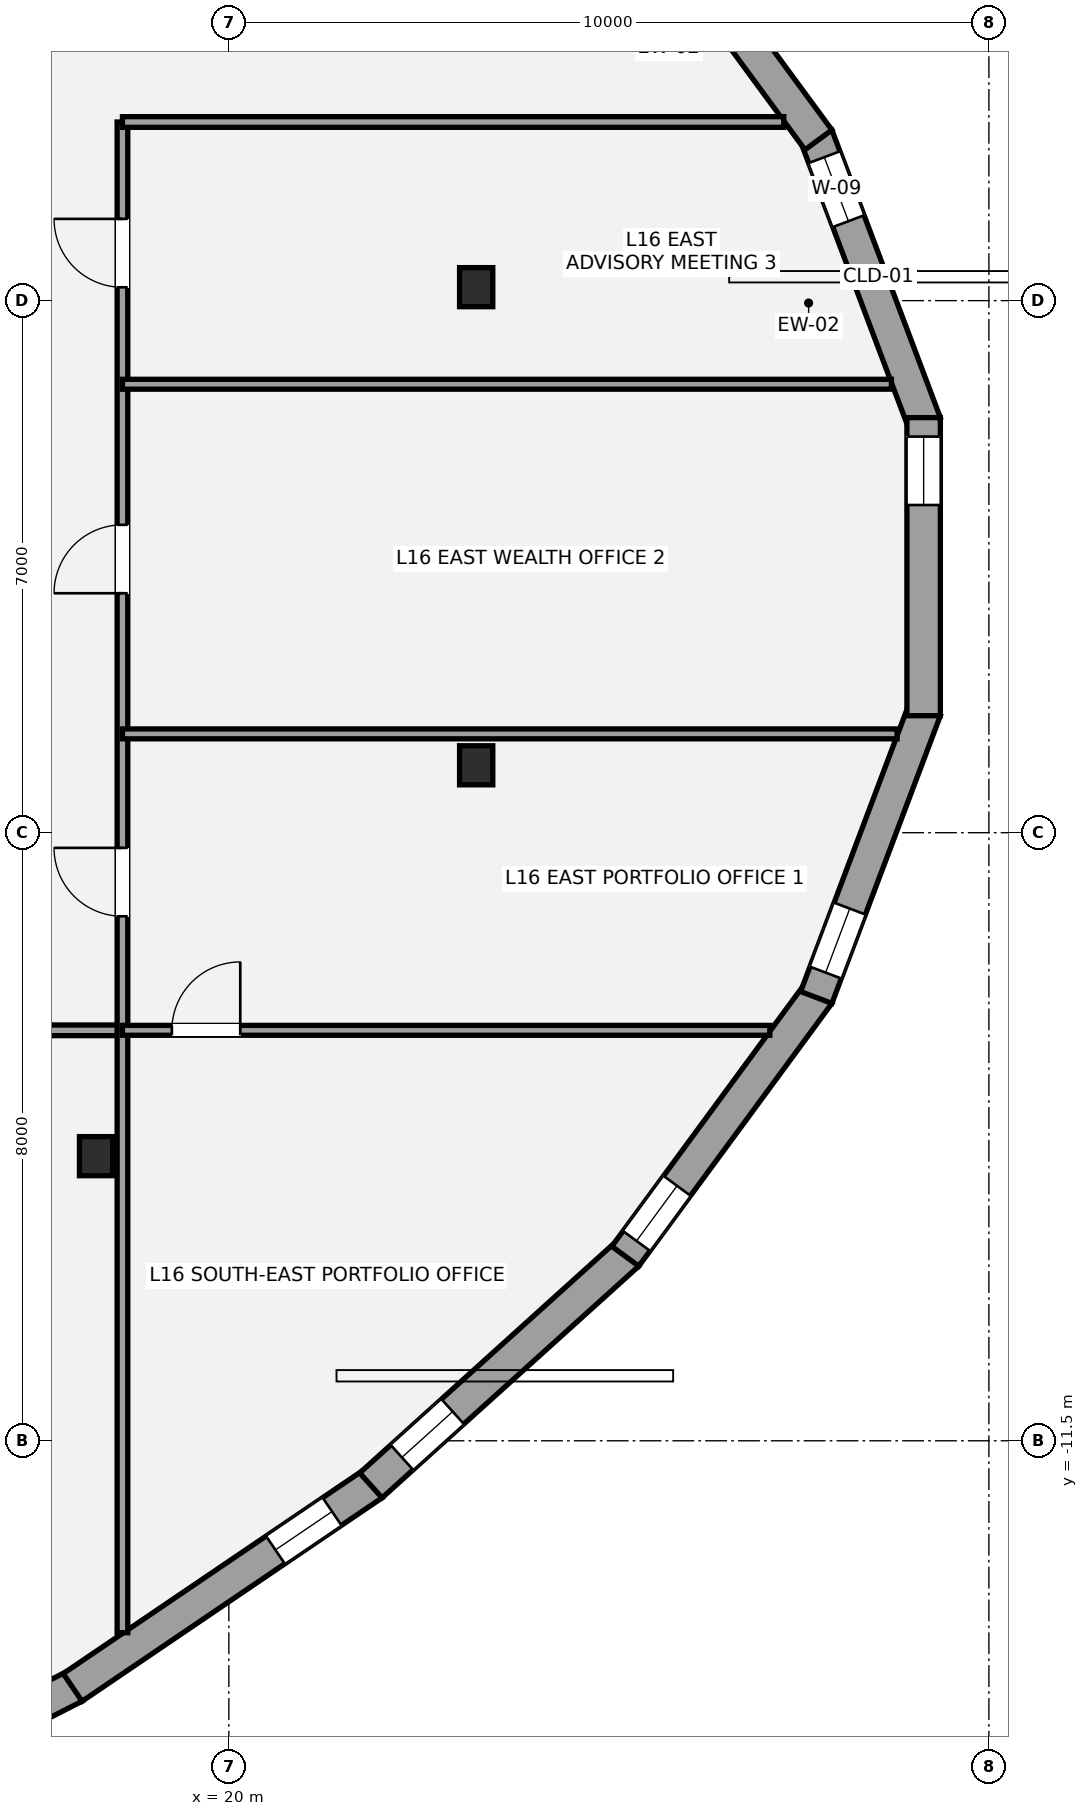
"""IFC4 building model, lengths in metres.
Left out: names, types, materials, properties, quantities, classifications, styles, units other than length and angle.
Written with IfcOpenShell. Run it as: python <this file> out.ifc"""

import sys

from ifc_helpers import new_model, si_unit, direction, frame, frame_2d, origin, origin_2d, place, context, subcontext, project, spatial, rectangle, i_section, extrude, element, fill, save


model = new_model("IFC4")
c1 = context("Model", 3, precision=1e-05, world=origin(), true_north=direction((0.0, 1.0)))
c2 = subcontext(c1, "Body", "Model", "MODEL_VIEW")
j1 = project(units=[si_unit("LENGTHUNIT", "METRE"), si_unit("PLANEANGLEUNIT", "RADIAN")], contexts=[c1])
p1 = place(None, origin())
s1 = spatial("IfcSite", under=j1, at=p1, CompositionType="ELEMENT")
p2 = place(p1, origin())
s2 = spatial("IfcBuilding", under=s1, at=p2, CompositionType="ELEMENT")
p3 = place(p2, frame((0.0, 0.0, 63.0)))
s3 = spatial("IfcBuildingStorey", under=s2, at=p3, CompositionType="ELEMENT", Elevation=63.0)
for number, where, z_axis, x_axis in (
    (1, (23.254, 3.677, 0.0), (0.0, 0.0, 1.0), (1.0, 0.0, 0.0)),
    (2, (18.253, -7.756, 0.0), (0.0, 0.0, 1.0), (1.0, 0.0, 0.0)),
    (3, (23.254, -2.613, 0.0), (0.0, 0.0, 1.0), (1.0, 0.0, 0.0)),
):
    element("IfcColumn", number, at=place(p3, frame(where, z_axis=z_axis, x_axis=x_axis)), inside=s3, PredefinedType="COLUMN", context=c2, shape_type="SweptSolid", body=[
        extrude(i_section(OverallWidth=0.437, OverallDepth=0.514, WebThickness=0.061, FlangeThickness=0.097, at=origin_2d()), origin(), (0.0, 0.0, 1.0), 3.6),
    ])
p4 = place(p3, frame((27.729, 5.668, 0.0), z_axis=(0.0, 0.0, 1.0), x_axis=(0.352750180024, -0.935717537771, 0.0)))
e4 = element("IfcWall", 4, at=p4, inside=s3, PredefinedType="STANDARD", context=c2, shape_type="SweptSolid", body=[
    extrude(rectangle(XDim=4.045, YDim=0.44, at=frame_2d((2.022, 0.0))), origin(), (0.0, 0.0, 1.0), 2.529),
])
p5 = place(p4, frame((0.3, 0.0, 0.92)))
e5 = element("IfcOpeningElement", 5, at=p5, cuts=e4, PredefinedType="OPENING", context=c2, shape_type="SweptSolid", body=[
    extrude(rectangle(XDim=0.9, YDim=1.35, at=frame_2d((0.45, 0.675))), frame((0.0, 0.23, 0.0), z_axis=(0.0, -1.0, 0.0), x_axis=(1.0, 0.0, 0.0)), (0.0, 0.0, 1.0), 0.46),
])
p6 = place(p3, frame((25.216, 9.072, 0.0), z_axis=(0.0, 0.0, 1.0), x_axis=(0.592261182237, -0.80574604685, 0.0)))
e6 = element("IfcWall", 6, at=p6, inside=s3, PredefinedType="STANDARD", context=c2, shape_type="SweptSolid", body=[
    extrude(rectangle(XDim=4.291, YDim=0.44, at=frame_2d((2.146, 0.0))), origin(), (0.0, 0.0, 1.0), 2.529),
])
p7 = place(p6, frame((0.449, 0.0, 0.58)))
e7 = element("IfcOpeningElement", 7, at=p7, cuts=e6, PredefinedType="OPENING", context=c2, shape_type="SweptSolid", body=[
    extrude(rectangle(XDim=0.9, YDim=1.35, at=frame_2d((0.45, 0.675))), frame((0.0, 0.23, 0.0), z_axis=(0.0, -1.0, 0.0), x_axis=(1.0, 0.0, 0.0)), (0.0, 0.0, 1.0), 0.46),
])
p8 = place(p3, frame((17.968, -14.731, 0.0), z_axis=(0.0, 0.0, 1.0), x_axis=(-0.891072734441, -0.45386053137, 0.0)))
e8 = element("IfcWall", 8, at=p8, inside=s3, PredefinedType="STANDARD", context=c2, shape_type="SweptSolid", body=[
    extrude(rectangle(XDim=5.045, YDim=0.44, at=frame_2d((2.522, 0.0))), origin(), (0.0, 0.0, 1.0), 2.529),
])
p9 = place(p8, frame((3.445, 0.0, 0.58)))
e9 = element("IfcOpeningElement", 9, at=p9, cuts=e8, PredefinedType="OPENING", context=c2, shape_type="SweptSolid", body=[
    extrude(rectangle(XDim=1.4, YDim=1.55, at=frame_2d((0.7, 0.775))), frame((0.0, 0.23, 0.0), z_axis=(0.0, -1.0, 0.0), x_axis=(1.0, 0.0, 0.0)), (0.0, 0.0, 1.0), 0.46),
])
p10 = place(p3, frame((21.893, -12.068, 0.0), z_axis=(0.0, 0.0, 1.0), x_axis=(-0.827693991977, -0.561179699959, 0.0)))
e10 = element("IfcWall", 10, at=p10, inside=s3, PredefinedType="STANDARD", context=c2, shape_type="SweptSolid", body=[
    extrude(rectangle(XDim=4.77, YDim=0.44, at=frame_2d((2.385, 0.0))), origin(), (0.0, 0.0, 1.0), 2.529),
])
p11 = place(p10, frame((0.646, 0.0, 0.58)))
e11 = element("IfcOpeningElement", 11, at=p11, cuts=e10, PredefinedType="OPENING", context=c2, shape_type="SweptSolid", body=[
    extrude(rectangle(XDim=0.9, YDim=1.35, at=frame_2d((0.45, 0.675))), frame((0.0, 0.23, 0.0), z_axis=(0.0, -1.0, 0.0), x_axis=(1.0, 0.0, 0.0)), (0.0, 0.0, 1.0), 0.46),
])
p12 = place(p3, frame((25.246, -9.039, 0.0), z_axis=(0.0, 0.0, 1.0), x_axis=(-0.742354052059, -0.670007806963, 0.0)))
e12 = element("IfcWall", 12, at=p12, inside=s3, PredefinedType="STANDARD", context=c2, shape_type="SweptSolid", body=[
    extrude(rectangle(XDim=4.549, YDim=0.44, at=frame_2d((2.274, 0.0))), origin(), (0.0, 0.0, 1.0), 2.529),
])
p13 = place(p12, frame((3.099, 0.0, 0.58)))
e13 = element("IfcOpeningElement", 13, at=p13, cuts=e12, PredefinedType="OPENING", context=c2, shape_type="SweptSolid", body=[
    extrude(rectangle(XDim=0.9, YDim=1.35, at=frame_2d((0.45, 0.675))), frame((0.0, 0.23, 0.0), z_axis=(0.0, -1.0, 0.0), x_axis=(1.0, 0.0, 0.0)), (0.0, 0.0, 1.0), 0.46),
])
p14 = place(p3, frame((27.757, -5.615, 0.0), z_axis=(0.0, 0.0, 1.0), x_axis=(-0.592261182237, -0.80574604685, 0.0)))
e14 = element("IfcWall", 14, at=p14, inside=s3, PredefinedType="STANDARD", context=c2, shape_type="SweptSolid", body=[
    extrude(rectangle(XDim=4.291, YDim=0.44, at=frame_2d((2.146, 0.0))), origin(), (0.0, 0.0, 1.0), 2.529),
])
p15 = place(p14, frame((3.141, 0.0, 0.58)))
e15 = element("IfcOpeningElement", 15, at=p15, cuts=e14, PredefinedType="OPENING", context=c2, shape_type="SweptSolid", body=[
    extrude(rectangle(XDim=0.9, YDim=1.35, at=frame_2d((0.45, 0.675))), frame((0.0, 0.23, 0.0), z_axis=(0.0, -1.0, 0.0), x_axis=(1.0, 0.0, 0.0)), (0.0, 0.0, 1.0), 0.46),
])
p16 = place(p3, frame((29.155, -1.883, 0.0), z_axis=(0.0, 0.0, 1.0), x_axis=(-0.352750180024, -0.935717537771, 0.0)))
e16 = element("IfcWall", 16, at=p16, inside=s3, PredefinedType="STANDARD", context=c2, shape_type="SweptSolid", body=[
    extrude(rectangle(XDim=4.045, YDim=0.44, at=frame_2d((2.022, 0.0))), origin(), (0.0, 0.0, 1.0), 2.529),
])
p17 = place(p16, frame((2.795, 0.0, 0.58)))
e17 = element("IfcOpeningElement", 17, at=p17, cuts=e16, PredefinedType="OPENING", context=c2, shape_type="SweptSolid", body=[
    extrude(rectangle(XDim=0.9, YDim=1.35, at=frame_2d((0.45, 0.675))), frame((0.0, 0.23, 0.0), z_axis=(0.0, -1.0, 0.0), x_axis=(1.0, 0.0, 0.0)), (0.0, 0.0, 1.0), 0.46),
])
p18 = place(p3, frame((29.141, 1.961, 0.0), z_axis=(0.0, 0.0, 1.0), x_axis=(0.0, -1.0, 0.0)))
e18 = element("IfcWall", 18, at=p18, inside=s3, PredefinedType="STANDARD", context=c2, shape_type="SweptSolid", body=[
    extrude(rectangle(XDim=3.921, YDim=0.44, at=frame_2d((1.961, 0.0))), origin(), (0.0, 0.0, 1.0), 2.533),
])
p19 = place(p18, frame((0.25, 0.0, 0.58)))
e19 = element("IfcOpeningElement", 19, at=p19, cuts=e18, PredefinedType="OPENING", context=c2, shape_type="SweptSolid", body=[
    extrude(rectangle(XDim=0.9, YDim=1.35, at=frame_2d((0.45, 0.675))), frame((0.0, 0.23, 0.0), z_axis=(0.0, -1.0, 0.0), x_axis=(1.0, 0.0, 0.0)), (0.0, 0.0, 1.0), 0.46),
])
p20 = place(p3, frame((-16.1, -6.1, 0.0), z_axis=(0.0, 0.0, 1.0), x_axis=(1.0, 0.0, 0.0)))
e20 = element("IfcWall", 20, at=p20, inside=s3, PredefinedType="PARTITIONING", context=c2, shape_type="SweptSolid", body=[
    extrude(rectangle(XDim=34.7, YDim=0.14, at=frame_2d((17.35, 0.0))), origin(), (0.0, 0.0, 1.0), 3.4),
])
p21 = place(p20, frame((8.1, 0.0, 0.0)))
e21 = element("IfcOpeningElement", 21, at=p21, cuts=e20, PredefinedType="OPENING", context=c2, shape_type="SweptSolid", body=[
    extrude(rectangle(XDim=0.9, YDim=2.1, at=frame_2d((0.45, 1.05))), frame((0.0, 0.08, 0.0), z_axis=(0.0, -1.0, 0.0), x_axis=(1.0, 0.0, 0.0)), (0.0, 0.0, 1.0), 0.16),
])
p22 = place(p20, frame((25.45, 0.0, 0.0)))
e22 = element("IfcOpeningElement", 22, at=p22, cuts=e20, PredefinedType="OPENING", context=c2, shape_type="SweptSolid", body=[
    extrude(rectangle(XDim=0.9, YDim=2.1, at=frame_2d((0.45, 1.05))), frame((0.0, 0.08, 0.0), z_axis=(0.0, -1.0, 0.0), x_axis=(1.0, 0.0, 0.0)), (0.0, 0.0, 1.0), 0.16),
])
p23 = place(p3, frame((18.6, -14.025, 0.0), z_axis=(0.0, 0.0, 1.0), x_axis=(0.0, 1.0, 0.0)))
e23 = element("IfcWall", 23, at=p23, inside=s3, PredefinedType="PARTITIONING", context=c2, shape_type="SweptSolid", body=[
    extrude(rectangle(XDim=19.875, YDim=0.14, at=frame_2d((9.938, 0.0))), origin(), (0.0, 0.0, 1.0), 2.779),
])
p24 = place(p23, frame((9.426, 0.0, 0.0)))
e24 = element("IfcOpeningElement", 24, at=p24, cuts=e23, PredefinedType="OPENING", context=c2, shape_type="SweptSolid", body=[
    extrude(rectangle(XDim=0.9, YDim=2.1, at=frame_2d((0.45, 1.05))), frame((0.0, 0.08, 0.0), z_axis=(0.0, -1.0, 0.0), x_axis=(1.0, 0.0, 0.0)), (0.0, 0.0, 1.0), 0.16),
])
p25 = place(p23, frame((13.676, 0.0, 0.0)))
e25 = element("IfcOpeningElement", 25, at=p25, cuts=e23, PredefinedType="OPENING", context=c2, shape_type="SweptSolid", body=[
    extrude(rectangle(XDim=0.9, YDim=2.1, at=frame_2d((0.45, 1.05))), frame((0.0, 0.08, 0.0), z_axis=(0.0, -1.0, 0.0), x_axis=(1.0, 0.0, 0.0)), (0.0, 0.0, 1.0), 0.16),
])
p26 = place(p23, frame((17.701, 0.0, 0.0)))
e26 = element("IfcOpeningElement", 26, at=p26, cuts=e23, PredefinedType="OPENING", context=c2, shape_type="SweptSolid", body=[
    extrude(rectangle(XDim=0.9, YDim=2.1, at=frame_2d((0.45, 1.05))), frame((0.0, 0.08, 0.0), z_axis=(0.0, -1.0, 0.0), x_axis=(1.0, 0.0, 0.0)), (0.0, 0.0, 1.0), 0.16),
])
p27 = place(p3, frame((18.6, 5.85, 0.0), z_axis=(0.0, 0.0, 1.0), x_axis=(1.0, 0.0, 0.0)))
e27 = element("IfcWall", 27, at=p27, inside=s3, PredefinedType="PARTITIONING", context=c2, shape_type="SweptSolid", body=[
    extrude(rectangle(XDim=8.701, YDim=0.14, at=frame_2d((4.351, 0.0))), origin(), (0.0, 0.0, 1.0), 2.853),
])
p28 = place(p3, frame((18.6, -6.1, 0.0), z_axis=(0.0, 0.0, 1.0), x_axis=(1.0, 0.0, 0.0)))
e28 = element("IfcWall", 28, at=p28, inside=s3, PredefinedType="PARTITIONING", context=c2, shape_type="SweptSolid", body=[
    extrude(rectangle(XDim=8.517, YDim=0.13, at=frame_2d((4.259, 0.0))), origin(), (0.0, 0.0, 1.0), 2.779),
])
p29 = place(p28, frame((0.65, 0.0, 0.0)))
e29 = element("IfcOpeningElement", 29, at=p29, cuts=e28, PredefinedType="OPENING", context=c2, shape_type="SweptSolid", body=[
    extrude(rectangle(XDim=0.9, YDim=2.1, at=frame_2d((0.45, 1.05))), frame((0.0, 0.075, 0.0), z_axis=(0.0, -1.0, 0.0), x_axis=(1.0, 0.0, 0.0)), (0.0, 0.0, 1.0), 0.15),
])
p30 = place(p3, frame((18.6, -2.2, 0.0), z_axis=(0.0, 0.0, 1.0), x_axis=(1.0, 0.0, 0.0)))
e30 = element("IfcWall", 30, at=p30, inside=s3, PredefinedType="PARTITIONING", context=c2, shape_type="SweptSolid", body=[
    extrude(rectangle(XDim=10.192, YDim=0.13, at=frame_2d((5.096, 0.0))), origin(), (0.0, 0.0, 1.0), 2.841),
])
p31 = place(p3, frame((18.6, 2.4, 0.0), z_axis=(0.0, 0.0, 1.0), x_axis=(1.0, 0.0, 0.0)))
e31 = element("IfcWall", 31, at=p31, inside=s3, PredefinedType="PARTITIONING", context=c2, shape_type="SweptSolid", body=[
    extrude(rectangle(XDim=10.117, YDim=0.13, at=frame_2d((5.058, 0.0))), origin(), (0.0, 0.0, 1.0), 2.841),
])
p32 = place(p5, origin())
e32 = element("IfcWindow", 32, at=p32, inside=s3, PartitioningType="SINGLE_PANEL", PredefinedType="WINDOW", context=c2, shape_type="SweptSolid", body=[
    extrude(rectangle(XDim=0.9, YDim=1.35, at=frame_2d((0.45, 0.675))), frame((0.0, -0.01, 0.0), z_axis=(0.0, -1.0, 0.0), x_axis=(1.0, 0.0, 0.0)), (0.0, 0.0, 1.0), 0.06),
])
fill(e5, e32)
p33 = place(p11, origin())
e33 = element("IfcWindow", 33, at=p33, inside=s3, PartitioningType="SINGLE_PANEL", PredefinedType="WINDOW", context=c2, shape_type="SweptSolid", body=[
    extrude(rectangle(XDim=0.9, YDim=1.35, at=frame_2d((0.45, 0.675))), frame((0.0, -0.01, 0.0), z_axis=(0.0, -1.0, 0.0), x_axis=(1.0, 0.0, 0.0)), (0.0, 0.0, 1.0), 0.06),
])
fill(e11, e33)
p34 = place(p13, origin())
e34 = element("IfcWindow", 34, at=p34, inside=s3, PartitioningType="SINGLE_PANEL", PredefinedType="WINDOW", context=c2, shape_type="SweptSolid", body=[
    extrude(rectangle(XDim=0.9, YDim=1.35, at=frame_2d((0.45, 0.675))), frame((0.0, -0.01, 0.0), z_axis=(0.0, -1.0, 0.0), x_axis=(1.0, 0.0, 0.0)), (0.0, 0.0, 1.0), 0.06),
])
fill(e13, e34)
p35 = place(p15, origin())
e35 = element("IfcWindow", 35, at=p35, inside=s3, PartitioningType="SINGLE_PANEL", PredefinedType="WINDOW", context=c2, shape_type="SweptSolid", body=[
    extrude(rectangle(XDim=0.9, YDim=1.35, at=frame_2d((0.45, 0.675))), frame((0.0, -0.01, 0.0), z_axis=(0.0, -1.0, 0.0), x_axis=(1.0, 0.0, 0.0)), (0.0, 0.0, 1.0), 0.06),
])
fill(e15, e35)
p36 = place(p17, origin())
e36 = element("IfcWindow", 36, at=p36, inside=s3, PartitioningType="SINGLE_PANEL", PredefinedType="WINDOW", context=c2, shape_type="SweptSolid", body=[
    extrude(rectangle(XDim=0.9, YDim=1.35, at=frame_2d((0.45, 0.675))), frame((0.0, -0.01, 0.0), z_axis=(0.0, -1.0, 0.0), x_axis=(1.0, 0.0, 0.0)), (0.0, 0.0, 1.0), 0.06),
])
fill(e17, e36)
p37 = place(p19, origin())
e37 = element("IfcWindow", 37, at=p37, inside=s3, PartitioningType="SINGLE_PANEL", PredefinedType="WINDOW", context=c2, shape_type="SweptSolid", body=[
    extrude(rectangle(XDim=0.9, YDim=1.35, at=frame_2d((0.45, 0.675))), frame((0.0, -0.01, 0.0), z_axis=(0.0, -1.0, 0.0), x_axis=(1.0, 0.0, 0.0)), (0.0, 0.0, 1.0), 0.06),
])
fill(e19, e37)
p38 = place(p29, origin())
e38 = element("IfcDoor", 38, at=p38, inside=s3, OperationType="SINGLE_SWING_RIGHT", PredefinedType="DOOR", context=c2, shape_type="SweptSolid", body=[
    extrude(rectangle(XDim=0.9, YDim=2.1, at=frame_2d((0.45, 1.05))), frame((0.0, 0.025, 0.0), z_axis=(0.0, -1.0, 0.0), x_axis=(1.0, 0.0, 0.0)), (0.0, 0.0, 1.0), 0.05),
])
fill(e29, e38)
p39 = place(p24, origin())
e39 = element("IfcDoor", 39, at=p39, inside=s3, OperationType="SINGLE_SWING_RIGHT", PredefinedType="DOOR", context=c2, shape_type="SweptSolid", body=[
    extrude(rectangle(XDim=0.9, YDim=2.1, at=frame_2d((0.45, 1.05))), frame((0.0, 0.025, 0.0), z_axis=(0.0, -1.0, 0.0), x_axis=(1.0, 0.0, 0.0)), (0.0, 0.0, 1.0), 0.05),
])
fill(e24, e39)
p40 = place(p25, origin())
e40 = element("IfcDoor", 40, at=p40, inside=s3, OperationType="SINGLE_SWING_LEFT", PredefinedType="DOOR", context=c2, shape_type="SweptSolid", body=[
    extrude(rectangle(XDim=0.9, YDim=2.1, at=frame_2d((0.45, 1.05))), frame((0.0, 0.025, 0.0), z_axis=(0.0, -1.0, 0.0), x_axis=(1.0, 0.0, 0.0)), (0.0, 0.0, 1.0), 0.05),
])
fill(e25, e40)
p41 = place(p26, origin())
e41 = element("IfcDoor", 41, at=p41, inside=s3, OperationType="SINGLE_SWING_RIGHT", PredefinedType="DOOR", context=c2, shape_type="SweptSolid", body=[
    extrude(rectangle(XDim=0.9, YDim=2.1, at=frame_2d((0.45, 1.05))), frame((0.0, 0.025, 0.0), z_axis=(0.0, -1.0, 0.0), x_axis=(1.0, 0.0, 0.0)), (0.0, 0.0, 1.0), 0.05),
])
fill(e26, e41)
save(model, sys.argv[1])
